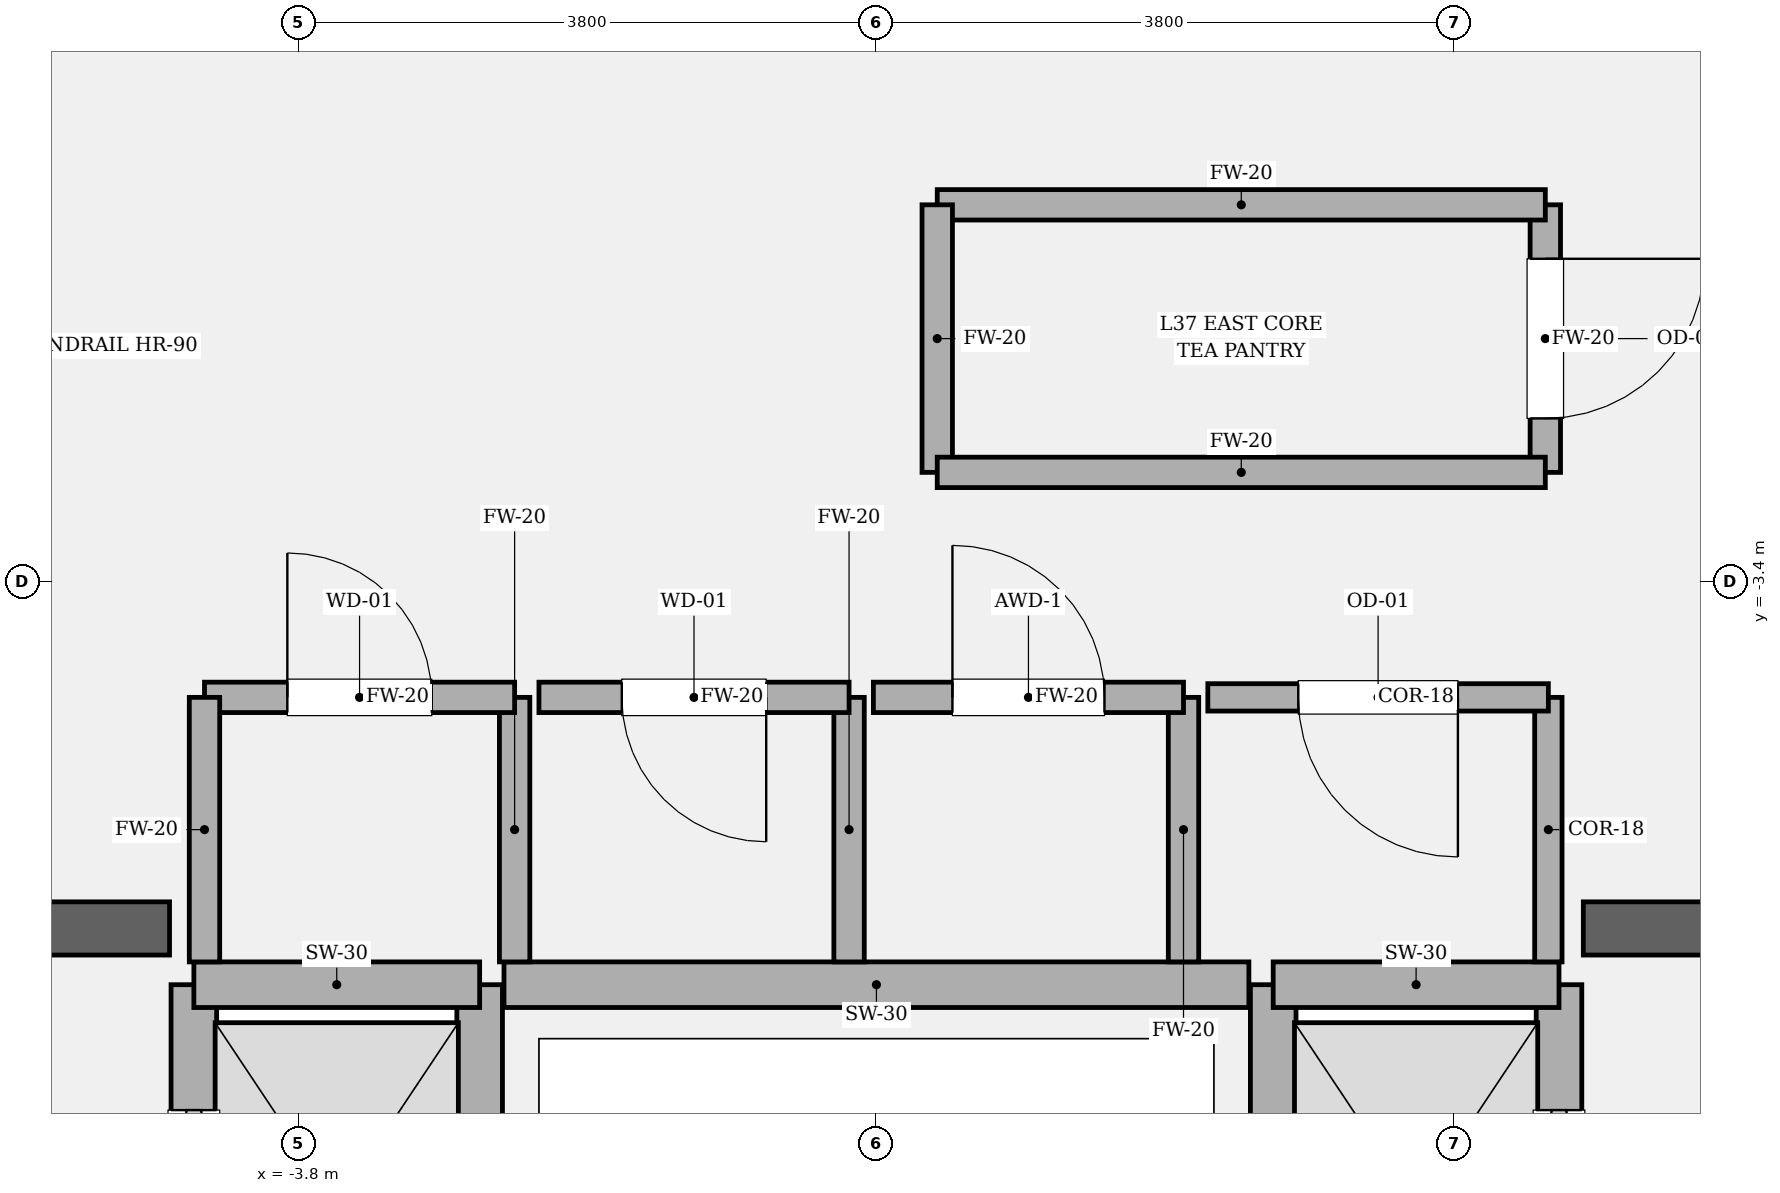
"""IFC4 building model, lengths in metres.
Left out: names, types, materials, properties, quantities, classifications, styles, units other than length and angle.
Written with IfcOpenShell. Run it as: python <this file> out.ifc"""

import sys

from ifc_helpers import new_model, si_unit, direction, frame, frame_2d, origin, place, context, subcontext, project, spatial, rectangle, extrude, element, fill, save


model = new_model("IFC4")
c1 = context("Model", 3, precision=1e-05, world=origin(), true_north=direction((0.0, 1.0)))
c2 = subcontext(c1, "Body", "Model", "MODEL_VIEW")
j1 = project(units=[si_unit("LENGTHUNIT", "METRE"), si_unit("PLANEANGLEUNIT", "RADIAN")], contexts=[c1])
p1 = place(None, origin())
s1 = spatial("IfcSite", under=j1, at=p1, CompositionType="ELEMENT")
p2 = place(p1, origin())
s2 = spatial("IfcBuilding", under=s1, at=p2, CompositionType="ELEMENT")
p3 = place(p2, frame((0.0, 0.0, 160.05)))
s3 = spatial("IfcBuildingStorey", under=s2, at=p3, CompositionType="ELEMENT", Elevation=160.05)
p4 = place(p3, frame((-9.875, -5.68, 0.0), z_axis=(0.0, 0.0, 1.0), x_axis=(1.0, 0.0, 0.0)))
e1 = element("IfcWall", 1, at=p4, inside=s3, PredefinedType="SOLIDWALL", context=c2, shape_type="SweptSolid", body=[
    extrude(rectangle(XDim=5.225, YDim=0.35, at=frame_2d((2.613, 0.0))), origin(), (0.0, 0.0, 1.0), 4.05),
])
p5 = place(p4, frame((1.335, 0.0, 0.0)))
e2 = element("IfcOpeningElement", 2, at=p5, cuts=e1, PredefinedType="OPENING", context=c2, shape_type="SweptSolid", body=[
    extrude(rectangle(XDim=1.18, YDim=2.2, at=frame_2d((0.59, 1.1))), frame((0.0, 0.185, 0.0), z_axis=(0.0, -1.0, 0.0), x_axis=(1.0, 0.0, 0.0)), (0.0, 0.0, 1.0), 0.37),
])
p6 = place(p3, frame((4.65, -5.68, 0.0), z_axis=(0.0, 0.0, 1.0), x_axis=(1.0, 0.0, 0.0)))
e3 = element("IfcWall", 3, at=p6, inside=s3, PredefinedType="SOLIDWALL", context=c2, shape_type="SweptSolid", body=[
    extrude(rectangle(XDim=5.225, YDim=0.35, at=frame_2d((2.613, 0.0))), origin(), (0.0, 0.0, 1.0), 4.05),
])
p7 = place(p6, frame((2.71, 0.0, 0.0)))
e4 = element("IfcOpeningElement", 4, at=p7, cuts=e3, PredefinedType="OPENING", context=c2, shape_type="SweptSolid", body=[
    extrude(rectangle(XDim=1.18, YDim=2.2, at=frame_2d((0.59, 1.1))), frame((0.0, 0.185, 0.0), z_axis=(0.0, -1.0, 0.0), x_axis=(1.0, 0.0, 0.0)), (0.0, 0.0, 1.0), 0.37),
])
p8 = place(p3, frame((-4.49, -8.82, 0.0), z_axis=(0.0, 0.0, 1.0), x_axis=(0.0, 1.0, 0.0)))
e5 = element("IfcWall", 5, at=p8, inside=s3, PredefinedType="SOLIDWALL", context=c2, shape_type="SweptSolid", body=[
    extrude(rectangle(XDim=2.77, YDim=0.3, at=frame_2d((1.385, 0.0))), origin(), (0.0, 0.0, 1.0), 3.83),
])
p9 = place(p8, frame((0.825, 0.0, 0.0)))
e6 = element("IfcOpeningElement", 6, at=p9, cuts=e5, PredefinedType="OPENING", context=c2, shape_type="SweptSolid", body=[
    extrude(rectangle(XDim=1.12, YDim=2.25, at=frame_2d((0.56, 1.125))), frame((0.0, 0.16, 0.0), z_axis=(0.0, -1.0, 0.0), x_axis=(1.0, 0.0, 0.0)), (0.0, 0.0, 1.0), 0.32),
])
p10 = place(p3, frame((-2.61, -8.82, 0.0), z_axis=(0.0, 0.0, 1.0), x_axis=(0.0, 1.0, 0.0)))
e7 = element("IfcWall", 7, at=p10, inside=s3, PredefinedType="SOLIDWALL", context=c2, shape_type="SweptSolid", body=[
    extrude(rectangle(XDim=2.77, YDim=0.3, at=frame_2d((1.385, 0.0))), origin(), (0.0, 0.0, 1.0), 3.83),
])
p11 = place(p3, frame((-4.49, -6.05, 0.0), z_axis=(0.0, 0.0, 1.0), x_axis=(1.0, 0.0, 0.0)))
e8 = element("IfcWall", 8, at=p11, inside=s3, PredefinedType="SOLIDWALL", context=c2, shape_type="SweptSolid", body=[
    extrude(rectangle(XDim=1.88, YDim=0.3, at=frame_2d((0.94, 0.0))), origin(), (0.0, 0.0, 1.0), 3.83),
])
p12 = place(p3, frame((4.49, -8.82, 0.0), z_axis=(0.0, 0.0, 1.0), x_axis=(0.0, 1.0, 0.0)))
e9 = element("IfcWall", 9, at=p12, inside=s3, PredefinedType="SOLIDWALL", context=c2, shape_type="SweptSolid", body=[
    extrude(rectangle(XDim=2.77, YDim=0.3, at=frame_2d((1.385, 0.0))), origin(), (0.0, 0.0, 1.0), 3.83),
])
p13 = place(p12, frame((0.825, 0.0, 0.0)))
e10 = element("IfcOpeningElement", 10, at=p13, cuts=e9, PredefinedType="OPENING", context=c2, shape_type="SweptSolid", body=[
    extrude(rectangle(XDim=1.12, YDim=2.25, at=frame_2d((0.56, 1.125))), frame((0.0, 0.16, 0.0), z_axis=(0.0, -1.0, 0.0), x_axis=(1.0, 0.0, 0.0)), (0.0, 0.0, 1.0), 0.32),
])
p14 = place(p3, frame((2.61, -8.82, 0.0), z_axis=(0.0, 0.0, 1.0), x_axis=(0.0, 1.0, 0.0)))
e11 = element("IfcWall", 11, at=p14, inside=s3, PredefinedType="SOLIDWALL", context=c2, shape_type="SweptSolid", body=[
    extrude(rectangle(XDim=2.77, YDim=0.3, at=frame_2d((1.385, 0.0))), origin(), (0.0, 0.0, 1.0), 3.83),
])
p15 = place(p3, frame((2.61, -6.05, 0.0), z_axis=(0.0, 0.0, 1.0), x_axis=(1.0, 0.0, 0.0)))
e12 = element("IfcWall", 12, at=p15, inside=s3, PredefinedType="SOLIDWALL", context=c2, shape_type="SweptSolid", body=[
    extrude(rectangle(XDim=1.88, YDim=0.3, at=frame_2d((0.94, 0.0))), origin(), (0.0, 0.0, 1.0), 3.83),
])
p16 = place(p3, frame((-2.45, -6.05, 0.0), z_axis=(0.0, 0.0, 1.0), x_axis=(1.0, 0.0, 0.0)))
e13 = element("IfcWall", 13, at=p16, inside=s3, PredefinedType="SOLIDWALL", context=c2, shape_type="SweptSolid", body=[
    extrude(rectangle(XDim=4.9, YDim=0.3, at=frame_2d((2.45, 0.0))), origin(), (0.0, 0.0, 1.0), 3.83),
])
p17 = place(p3, frame((-2.38, -5.9, 0.0), z_axis=(0.0, 0.0, 1.0), x_axis=(0.0, 1.0, 0.0)))
e14 = element("IfcWall", 14, at=p17, inside=s3, PredefinedType="SOLIDWALL", context=c2, shape_type="SweptSolid", body=[
    extrude(rectangle(XDim=1.74, YDim=0.2, at=frame_2d((0.87, 0.0))), origin(), (0.0, 0.0, 1.0), 3.83),
])
p18 = place(p3, frame((-2.38, -4.16, 0.0), z_axis=(0.0, 0.0, 1.0), x_axis=(-1.0, 0.0, 0.0)))
e15 = element("IfcWall", 15, at=p18, inside=s3, PredefinedType="SOLIDWALL", context=c2, shape_type="SweptSolid", body=[
    extrude(rectangle(XDim=2.04, YDim=0.2, at=frame_2d((1.02, 0.0))), origin(), (0.0, 0.0, 1.0), 3.83),
])
p19 = place(p18, frame((0.545, 0.0, 0.0)))
e16 = element("IfcOpeningElement", 16, at=p19, cuts=e15, PredefinedType="OPENING", context=c2, shape_type="SweptSolid", body=[
    extrude(rectangle(XDim=0.95, YDim=2.15, at=frame_2d((0.475, 1.075))), frame((0.0, 0.11, 0.0), z_axis=(0.0, -1.0, 0.0), x_axis=(1.0, 0.0, 0.0)), (0.0, 0.0, 1.0), 0.22),
])
for number, where, z_axis, x_axis in (
    (17, (-4.42, -4.16, 0.0), (0.0, 0.0, 1.0), (0.0, -1.0, 0.0)),
    (18, (-0.18, -5.9, 0.0), (0.0, 0.0, 1.0), (0.0, 1.0, 0.0)),
):
    element("IfcWall", number, at=place(p3, frame(where, z_axis=z_axis, x_axis=x_axis)), inside=s3, PredefinedType="SOLIDWALL", context=c2, shape_type="SweptSolid", body=[
        extrude(rectangle(XDim=1.74, YDim=0.2, at=frame_2d((0.87, 0.0))), origin(), (0.0, 0.0, 1.0), 3.83),
    ])
p20 = place(p3, frame((-0.18, -4.16, 0.0), z_axis=(0.0, 0.0, 1.0), x_axis=(-1.0, 0.0, 0.0)))
e19 = element("IfcWall", 19, at=p20, inside=s3, PredefinedType="SOLIDWALL", context=c2, shape_type="SweptSolid", body=[
    extrude(rectangle(XDim=2.04, YDim=0.2, at=frame_2d((1.02, 0.0))), origin(), (0.0, 0.0, 1.0), 3.83),
])
p21 = place(p20, frame((0.545, 0.0, 0.0)))
e20 = element("IfcOpeningElement", 20, at=p21, cuts=e19, PredefinedType="OPENING", context=c2, shape_type="SweptSolid", body=[
    extrude(rectangle(XDim=0.95, YDim=2.15, at=frame_2d((0.475, 1.075))), frame((0.0, 0.11, 0.0), z_axis=(0.0, -1.0, 0.0), x_axis=(1.0, 0.0, 0.0)), (0.0, 0.0, 1.0), 0.22),
])
p22 = place(p3, frame((2.02, -5.9, 0.0), z_axis=(0.0, 0.0, 1.0), x_axis=(0.0, 1.0, 0.0)))
e21 = element("IfcWall", 21, at=p22, inside=s3, PredefinedType="SOLIDWALL", context=c2, shape_type="SweptSolid", body=[
    extrude(rectangle(XDim=1.74, YDim=0.2, at=frame_2d((0.87, 0.0))), origin(), (0.0, 0.0, 1.0), 3.83),
])
p23 = place(p3, frame((2.02, -4.16, 0.0), z_axis=(0.0, 0.0, 1.0), x_axis=(-1.0, 0.0, 0.0)))
e22 = element("IfcWall", 22, at=p23, inside=s3, PredefinedType="SOLIDWALL", context=c2, shape_type="SweptSolid", body=[
    extrude(rectangle(XDim=2.04, YDim=0.2, at=frame_2d((1.02, 0.0))), origin(), (0.0, 0.0, 1.0), 3.83),
])
p24 = place(p23, frame((0.52, 0.0, 0.0)))
e23 = element("IfcOpeningElement", 23, at=p24, cuts=e22, PredefinedType="OPENING", context=c2, shape_type="SweptSolid", body=[
    extrude(rectangle(XDim=1.0, YDim=2.15, at=frame_2d((0.5, 1.075))), frame((0.0, 0.11, 0.0), z_axis=(0.0, -1.0, 0.0), x_axis=(1.0, 0.0, 0.0)), (0.0, 0.0, 1.0), 0.22),
])
p25 = place(p3, frame((4.42, -5.9, 0.0), z_axis=(0.0, 0.0, 1.0), x_axis=(0.0, 1.0, 0.0)))
e24 = element("IfcWall", 24, at=p25, inside=s3, PredefinedType="PARTITIONING", context=c2, shape_type="SweptSolid", body=[
    extrude(rectangle(XDim=1.74, YDim=0.18, at=frame_2d((0.87, 0.0))), origin(), (0.0, 0.0, 1.0), 3.83),
])
p26 = place(p3, frame((4.42, -4.16, 0.0), z_axis=(0.0, 0.0, 1.0), x_axis=(-1.0, 0.0, 0.0)))
e25 = element("IfcWall", 25, at=p26, inside=s3, PredefinedType="PARTITIONING", context=c2, shape_type="SweptSolid", body=[
    extrude(rectangle(XDim=2.24, YDim=0.18, at=frame_2d((1.12, 0.0))), origin(), (0.0, 0.0, 1.0), 3.83),
])
p27 = place(p26, frame((0.595, 0.0, 0.0)))
e26 = element("IfcOpeningElement", 26, at=p27, cuts=e25, PredefinedType="OPENING", context=c2, shape_type="SweptSolid", body=[
    extrude(rectangle(XDim=1.05, YDim=2.2, at=frame_2d((0.525, 1.1))), frame((0.0, 0.1, 0.0), z_axis=(0.0, -1.0, 0.0), x_axis=(1.0, 0.0, 0.0)), (0.0, 0.0, 1.0), 0.2),
])
p28 = place(p3, frame((4.4, -2.68, 0.0), z_axis=(0.0, 0.0, 1.0), x_axis=(0.0, 1.0, 0.0)))
e27 = element("IfcWall", 27, at=p28, inside=s3, PredefinedType="SOLIDWALL", context=c2, shape_type="SweptSolid", body=[
    extrude(rectangle(XDim=1.76, YDim=0.2, at=frame_2d((0.88, 0.0))), origin(), (0.0, 0.0, 1.0), 3.83),
])
p29 = place(p28, frame((0.355, 0.0, 0.0)))
e28 = element("IfcOpeningElement", 28, at=p29, cuts=e27, PredefinedType="OPENING", context=c2, shape_type="SweptSolid", body=[
    extrude(rectangle(XDim=1.05, YDim=2.2, at=frame_2d((0.525, 1.1))), frame((0.0, 0.11, 0.0), z_axis=(0.0, -1.0, 0.0), x_axis=(1.0, 0.0, 0.0)), (0.0, 0.0, 1.0), 0.22),
])
p30 = place(p3, frame((4.4, -0.92, 0.0), z_axis=(0.0, 0.0, 1.0), x_axis=(-1.0, 0.0, 0.0)))
e29 = element("IfcWall", 29, at=p30, inside=s3, PredefinedType="SOLIDWALL", context=c2, shape_type="SweptSolid", body=[
    extrude(rectangle(XDim=4.0, YDim=0.2, at=frame_2d((2.0, 0.0))), origin(), (0.0, 0.0, 1.0), 3.83),
])
p31 = place(p3, frame((0.4, -0.92, 0.0), z_axis=(0.0, 0.0, 1.0), x_axis=(0.0, -1.0, 0.0)))
e30 = element("IfcWall", 30, at=p31, inside=s3, PredefinedType="SOLIDWALL", context=c2, shape_type="SweptSolid", body=[
    extrude(rectangle(XDim=1.76, YDim=0.2, at=frame_2d((0.88, 0.0))), origin(), (0.0, 0.0, 1.0), 3.83),
])
p32 = place(p3, frame((0.4, -2.68, 0.0), z_axis=(0.0, 0.0, 1.0), x_axis=(1.0, 0.0, 0.0)))
e31 = element("IfcWall", 31, at=p32, inside=s3, PredefinedType="SOLIDWALL", context=c2, shape_type="SweptSolid", body=[
    extrude(rectangle(XDim=4.0, YDim=0.2, at=frame_2d((2.0, 0.0))), origin(), (0.0, 0.0, 1.0), 3.83),
])
p33 = place(p9, origin())
e32 = element("IfcDoor", 32, at=p33, inside=s3, OperationType="SLIDING_TO_LEFT", PredefinedType="DOOR", context=c2, shape_type="SweptSolid", body=[
    extrude(rectangle(XDim=1.12, YDim=2.25, at=frame_2d((0.56, 1.125))), frame((0.0, 0.025, 0.0), z_axis=(0.0, -1.0, 0.0), x_axis=(1.0, 0.0, 0.0)), (0.0, 0.0, 1.0), 0.05),
])
fill(e6, e32)
p34 = place(p13, origin())
e33 = element("IfcDoor", 33, at=p34, inside=s3, OperationType="SLIDING_TO_RIGHT", PredefinedType="DOOR", context=c2, shape_type="SweptSolid", body=[
    extrude(rectangle(XDim=1.12, YDim=2.25, at=frame_2d((0.56, 1.125))), frame((0.0, 0.025, 0.0), z_axis=(0.0, -1.0, 0.0), x_axis=(1.0, 0.0, 0.0)), (0.0, 0.0, 1.0), 0.05),
])
fill(e10, e33)
p35 = place(p19, origin())
e34 = element("IfcDoor", 34, at=p35, inside=s3, OperationType="SINGLE_SWING_RIGHT", PredefinedType="DOOR", context=c2, shape_type="SweptSolid", body=[
    extrude(rectangle(XDim=0.95, YDim=2.15, at=frame_2d((0.475, 1.075))), frame((0.0, 0.025, 0.0), z_axis=(0.0, -1.0, 0.0), x_axis=(1.0, 0.0, 0.0)), (0.0, 0.0, 1.0), 0.05),
])
fill(e16, e34)
p36 = place(p21, origin())
e35 = element("IfcDoor", 35, at=p36, inside=s3, OperationType="SINGLE_SWING_LEFT", PredefinedType="DOOR", context=c2, shape_type="SweptSolid", body=[
    extrude(rectangle(XDim=0.95, YDim=2.15, at=frame_2d((0.475, 1.075))), frame((0.0, 0.025, 0.0), z_axis=(0.0, -1.0, 0.0), x_axis=(1.0, 0.0, 0.0)), (0.0, 0.0, 1.0), 0.05),
])
fill(e20, e35)
p37 = place(p24, origin())
e36 = element("IfcDoor", 36, at=p37, inside=s3, OperationType="SINGLE_SWING_RIGHT", PredefinedType="DOOR", context=c2, shape_type="SweptSolid", body=[
    extrude(rectangle(XDim=1.0, YDim=2.15, at=frame_2d((0.5, 1.075))), frame((0.0, 0.025, 0.0), z_axis=(0.0, -1.0, 0.0), x_axis=(1.0, 0.0, 0.0)), (0.0, 0.0, 1.0), 0.05),
])
fill(e23, e36)
p38 = place(p27, origin())
e37 = element("IfcDoor", 37, at=p38, inside=s3, OperationType="SINGLE_SWING_LEFT", PredefinedType="DOOR", context=c2, shape_type="SweptSolid", body=[
    extrude(rectangle(XDim=1.05, YDim=2.2, at=frame_2d((0.525, 1.1))), frame((0.0, 0.025, 0.0), z_axis=(0.0, -1.0, 0.0), x_axis=(1.0, 0.0, 0.0)), (0.0, 0.0, 1.0), 0.05),
])
fill(e26, e37)
p39 = place(p29, origin())
e38 = element("IfcDoor", 38, at=p39, inside=s3, OperationType="SINGLE_SWING_RIGHT", PredefinedType="DOOR", context=c2, shape_type="SweptSolid", body=[
    extrude(rectangle(XDim=1.05, YDim=2.2, at=frame_2d((0.525, 1.1))), frame((0.0, 0.025, 0.0), z_axis=(0.0, -1.0, 0.0), x_axis=(1.0, 0.0, 0.0)), (0.0, 0.0, 1.0), 0.05),
])
fill(e28, e38)
save(model, sys.argv[1])
